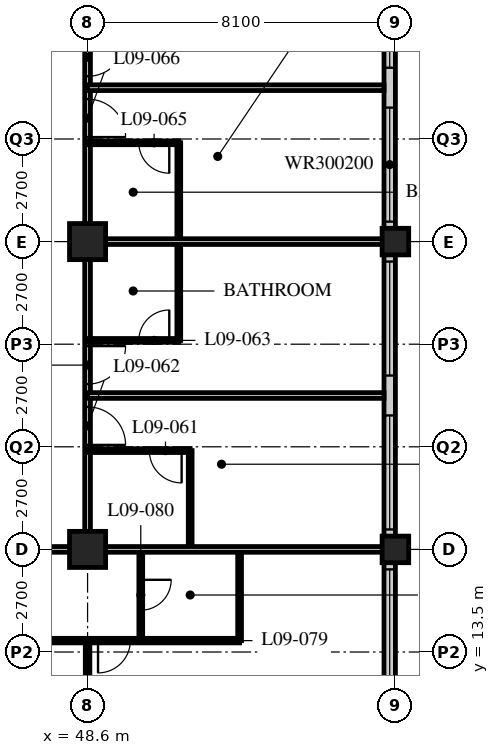
"""IFC4 building model, lengths in metres.
Left out: names, types, materials, properties, quantities, classifications, styles, units other than length and angle.
Written with IfcOpenShell. Run it as: python <this file> out.ifc"""

import sys

from ifc_helpers import new_model, si_unit, direction, frame, frame_2d, origin, origin_2d, place, context, subcontext, project, spatial, rectangle, hollow_rectangle, extrude, element, fill, save


model = new_model("IFC4")
c1 = context("Model", 3, precision=1e-05, world=origin(), true_north=direction((0.0, 1.0)))
c2 = subcontext(c1, "Body", "Model", "MODEL_VIEW")
j1 = project(units=[si_unit("LENGTHUNIT", "METRE"), si_unit("PLANEANGLEUNIT", "RADIAN")], contexts=[c1])
p1 = place(None, origin())
s1 = spatial("IfcSite", under=j1, at=p1, CompositionType="ELEMENT")
p2 = place(p1, origin())
s2 = spatial("IfcBuilding", under=s1, at=p2, CompositionType="ELEMENT")
p3 = place(p2, frame((0.0, 0.0, 43.2)))
s3 = spatial("IfcBuildingStorey", under=s2, at=p3, CompositionType="ELEMENT", Elevation=43.2)
for number, where, z_axis, x_axis in (
    (1, (48.6, 16.2, 0.0), (0.0, 0.0, 1.0), (1.0, 0.0, 0.0)),
    (2, (48.6, 24.3, 0.0), (0.0, 0.0, 1.0), (1.0, 0.0, 0.0)),
):
    element("IfcColumn", number, at=place(p3, frame(where, z_axis=z_axis, x_axis=x_axis)), inside=s3, PredefinedType="COLUMN", context=c2, shape_type="SweptSolid", body=[
        extrude(hollow_rectangle(XDim=0.95, YDim=0.95, WallThickness=0.095, at=origin_2d()), origin(), (0.0, 0.0, 1.0), 3.4),
    ])
for number, where, z_axis, x_axis in (
    (3, (56.7, 16.2, 0.0), (0.0, 0.0, 1.0), (1.0, 0.0, 0.0)),
    (4, (56.7, 24.3, 0.0), (0.0, 0.0, 1.0), (1.0, 0.0, 0.0)),
):
    element("IfcColumn", number, at=place(p3, frame(where, z_axis=z_axis, x_axis=x_axis)), inside=s3, PredefinedType="COLUMN", context=c2, shape_type="SweptSolid", body=[
        extrude(hollow_rectangle(XDim=0.7, YDim=0.7, WallThickness=0.06, at=origin_2d()), origin(), (0.0, 0.0, 1.0), 3.4),
    ])
p4 = place(p3, frame((56.55, 8.4, 0.0), z_axis=(0.0, 0.0, 1.0), x_axis=(0.0, 1.0, 0.0)))
e5 = element("IfcWall", 5, at=p4, inside=s3, PredefinedType="SOLIDWALL", context=c2, shape_type="SweptSolid", body=[
    extrude(rectangle(XDim=32.1, YDim=0.3, at=frame_2d((16.05, 0.0))), origin(), (0.0, 0.0, 1.0), 3.19),
])
p5 = place(p4, frame((0.225, 0.0, 0.9)))
e6 = element("IfcOpeningElement", 6, at=p5, cuts=e5, PredefinedType="OPENING", context=c2, shape_type="SweptSolid", body=[
    extrude(rectangle(XDim=3.0, YDim=2.0, at=frame_2d((1.5, 1.0))), frame((0.0, 0.16, 0.0), z_axis=(0.0, -1.0, 0.0), x_axis=(1.0, 0.0, 0.0)), (0.0, 0.0, 1.0), 0.32),
])
p6 = place(p4, frame((4.275, 0.0, 0.9)))
e7 = element("IfcOpeningElement", 7, at=p6, cuts=e5, PredefinedType="OPENING", context=c2, shape_type="SweptSolid", body=[
    extrude(rectangle(XDim=3.0, YDim=2.0, at=frame_2d((1.5, 1.0))), frame((0.0, 0.16, 0.0), z_axis=(0.0, -1.0, 0.0), x_axis=(1.0, 0.0, 0.0)), (0.0, 0.0, 1.0), 0.32),
])
p7 = place(p4, frame((8.325, 0.0, 0.9)))
e8 = element("IfcOpeningElement", 8, at=p7, cuts=e5, PredefinedType="OPENING", context=c2, shape_type="SweptSolid", body=[
    extrude(rectangle(XDim=3.0, YDim=2.0, at=frame_2d((1.5, 1.0))), frame((0.0, 0.16, 0.0), z_axis=(0.0, -1.0, 0.0), x_axis=(1.0, 0.0, 0.0)), (0.0, 0.0, 1.0), 0.32),
])
p8 = place(p4, frame((12.375, 0.0, 0.9)))
e9 = element("IfcOpeningElement", 9, at=p8, cuts=e5, PredefinedType="OPENING", context=c2, shape_type="SweptSolid", body=[
    extrude(rectangle(XDim=3.0, YDim=2.0, at=frame_2d((1.5, 1.0))), frame((0.0, 0.16, 0.0), z_axis=(0.0, -1.0, 0.0), x_axis=(1.0, 0.0, 0.0)), (0.0, 0.0, 1.0), 0.32),
])
p9 = place(p4, frame((16.425, 0.0, 0.9)))
e10 = element("IfcOpeningElement", 10, at=p9, cuts=e5, PredefinedType="OPENING", context=c2, shape_type="SweptSolid", body=[
    extrude(rectangle(XDim=3.0, YDim=2.0, at=frame_2d((1.5, 1.0))), frame((0.0, 0.16, 0.0), z_axis=(0.0, -1.0, 0.0), x_axis=(1.0, 0.0, 0.0)), (0.0, 0.0, 1.0), 0.32),
])
p10 = place(p4, frame((20.475, 0.0, 0.9)))
e11 = element("IfcOpeningElement", 11, at=p10, cuts=e5, PredefinedType="OPENING", context=c2, shape_type="SweptSolid", body=[
    extrude(rectangle(XDim=3.0, YDim=2.0, at=frame_2d((1.5, 1.0))), frame((0.0, 0.16, 0.0), z_axis=(0.0, -1.0, 0.0), x_axis=(1.0, 0.0, 0.0)), (0.0, 0.0, 1.0), 0.32),
])
p11 = place(p4, frame((24.525, 0.0, 0.9)))
e12 = element("IfcOpeningElement", 12, at=p11, cuts=e5, PredefinedType="OPENING", context=c2, shape_type="SweptSolid", body=[
    extrude(rectangle(XDim=3.0, YDim=2.0, at=frame_2d((1.5, 1.0))), frame((0.0, 0.16, 0.0), z_axis=(0.0, -1.0, 0.0), x_axis=(1.0, 0.0, 0.0)), (0.0, 0.0, 1.0), 0.32),
])
p12 = place(p4, frame((28.575, 0.0, 0.9)))
e13 = element("IfcOpeningElement", 13, at=p12, cuts=e5, PredefinedType="OPENING", context=c2, shape_type="SweptSolid", body=[
    extrude(rectangle(XDim=3.0, YDim=2.0, at=frame_2d((1.5, 1.0))), frame((0.0, 0.16, 0.0), z_axis=(0.0, -1.0, 0.0), x_axis=(1.0, 0.0, 0.0)), (0.0, 0.0, 1.0), 0.32),
])
p13 = place(p3, frame((8.1, 16.2, 0.0), z_axis=(0.0, 0.0, 1.0), x_axis=(1.0, 0.0, 0.0)))
e14 = element("IfcWall", 14, at=p13, inside=s3, PredefinedType="PARTITIONING", context=c2, shape_type="SweptSolid", body=[
    extrude(rectangle(XDim=40.5, YDim=0.15, at=frame_2d((20.25, 0.0))), origin(), (0.0, 0.0, 1.0), 2.578),
])
p14 = place(p13, frame((4.35, 0.0, 0.0)))
e15 = element("IfcOpeningElement", 15, at=p14, cuts=e14, PredefinedType="OPENING", context=c2, shape_type="SweptSolid", body=[
    extrude(rectangle(XDim=1.0, YDim=2.1, at=frame_2d((0.5, 1.05))), frame((0.0, 0.085, 0.0), z_axis=(0.0, -1.0, 0.0), x_axis=(1.0, 0.0, 0.0)), (0.0, 0.0, 1.0), 0.17),
])
p15 = place(p13, frame((10.85, 0.0, 0.0)))
e16 = element("IfcOpeningElement", 16, at=p15, cuts=e14, PredefinedType="OPENING", context=c2, shape_type="SweptSolid", body=[
    extrude(rectangle(XDim=1.0, YDim=2.1, at=frame_2d((0.5, 1.05))), frame((0.0, 0.085, 0.0), z_axis=(0.0, -1.0, 0.0), x_axis=(1.0, 0.0, 0.0)), (0.0, 0.0, 1.0), 0.17),
])
p16 = place(p13, frame((12.75, 0.0, 0.0)))
e17 = element("IfcOpeningElement", 17, at=p16, cuts=e14, PredefinedType="OPENING", context=c2, shape_type="SweptSolid", body=[
    extrude(rectangle(XDim=1.0, YDim=2.1, at=frame_2d((0.5, 1.05))), frame((0.0, 0.085, 0.0), z_axis=(0.0, -1.0, 0.0), x_axis=(1.0, 0.0, 0.0)), (0.0, 0.0, 1.0), 0.17),
])
p17 = place(p13, frame((18.95, 0.0, 0.0)))
e18 = element("IfcOpeningElement", 18, at=p17, cuts=e14, PredefinedType="OPENING", context=c2, shape_type="SweptSolid", body=[
    extrude(rectangle(XDim=1.0, YDim=2.1, at=frame_2d((0.5, 1.05))), frame((0.0, 0.085, 0.0), z_axis=(0.0, -1.0, 0.0), x_axis=(1.0, 0.0, 0.0)), (0.0, 0.0, 1.0), 0.17),
])
p18 = place(p13, frame((20.55, 0.0, 0.0)))
e19 = element("IfcOpeningElement", 19, at=p18, cuts=e14, PredefinedType="OPENING", context=c2, shape_type="SweptSolid", body=[
    extrude(rectangle(XDim=1.0, YDim=2.1, at=frame_2d((0.5, 1.05))), frame((0.0, 0.085, 0.0), z_axis=(0.0, -1.0, 0.0), x_axis=(1.0, 0.0, 0.0)), (0.0, 0.0, 1.0), 0.17),
])
p19 = place(p13, frame((27.05, 0.0, 0.0)))
e20 = element("IfcOpeningElement", 20, at=p19, cuts=e14, PredefinedType="OPENING", context=c2, shape_type="SweptSolid", body=[
    extrude(rectangle(XDim=1.0, YDim=2.1, at=frame_2d((0.5, 1.05))), frame((0.0, 0.085, 0.0), z_axis=(0.0, -1.0, 0.0), x_axis=(1.0, 0.0, 0.0)), (0.0, 0.0, 1.0), 0.17),
])
p20 = place(p13, frame((28.95, 0.0, 0.0)))
e21 = element("IfcOpeningElement", 21, at=p20, cuts=e14, PredefinedType="OPENING", context=c2, shape_type="SweptSolid", body=[
    extrude(rectangle(XDim=1.0, YDim=2.1, at=frame_2d((0.5, 1.05))), frame((0.0, 0.085, 0.0), z_axis=(0.0, -1.0, 0.0), x_axis=(1.0, 0.0, 0.0)), (0.0, 0.0, 1.0), 0.17),
])
p21 = place(p13, frame((34.85, 0.0, 0.0)))
e22 = element("IfcOpeningElement", 22, at=p21, cuts=e14, PredefinedType="OPENING", context=c2, shape_type="SweptSolid", body=[
    extrude(rectangle(XDim=1.0, YDim=2.1, at=frame_2d((0.5, 1.05))), frame((0.0, 0.085, 0.0), z_axis=(0.0, -1.0, 0.0), x_axis=(1.0, 0.0, 0.0)), (0.0, 0.0, 1.0), 0.17),
])
p22 = place(p13, frame((1.525, 0.0, 0.0)))
e23 = element("IfcOpeningElement", 23, at=p22, cuts=e14, PredefinedType="OPENING", context=c2, shape_type="SweptSolid", body=[
    extrude(rectangle(XDim=1.0, YDim=2.1, at=frame_2d((0.5, 1.05))), frame((0.0, 0.085, 0.0), z_axis=(0.0, -1.0, 0.0), x_axis=(1.0, 0.0, 0.0)), (0.0, 0.0, 1.0), 0.17),
])
p23 = place(p13, frame((37.975, 0.0, 0.0)))
e24 = element("IfcOpeningElement", 24, at=p23, cuts=e14, PredefinedType="OPENING", context=c2, shape_type="SweptSolid", body=[
    extrude(rectangle(XDim=1.0, YDim=2.1, at=frame_2d((0.5, 1.05))), frame((0.0, 0.085, 0.0), z_axis=(0.0, -1.0, 0.0), x_axis=(1.0, 0.0, 0.0)), (0.0, 0.0, 1.0), 0.17),
])
p24 = place(p3, frame((48.6, 16.2, 0.0), z_axis=(0.0, 0.0, 1.0), x_axis=(0.0, 1.0, 0.0)))
e25 = element("IfcWall", 25, at=p24, inside=s3, PredefinedType="PARTITIONING", context=c2, shape_type="SweptSolid", body=[
    extrude(rectangle(XDim=26.1, YDim=0.15, at=frame_2d((13.05, 0.0))), origin(), (0.0, 0.0, 1.0), 2.578),
])
p25 = place(p24, frame((2.75, 0.0, 0.0)))
e26 = element("IfcOpeningElement", 26, at=p25, cuts=e25, PredefinedType="OPENING", context=c2, shape_type="SweptSolid", body=[
    extrude(rectangle(XDim=1.0, YDim=2.1, at=frame_2d((0.5, 1.05))), frame((0.0, 0.085, 0.0), z_axis=(0.0, -1.0, 0.0), x_axis=(1.0, 0.0, 0.0)), (0.0, 0.0, 1.0), 0.17),
])
p26 = place(p24, frame((4.35, 0.0, 0.0)))
e27 = element("IfcOpeningElement", 27, at=p26, cuts=e25, PredefinedType="OPENING", context=c2, shape_type="SweptSolid", body=[
    extrude(rectangle(XDim=1.0, YDim=2.1, at=frame_2d((0.5, 1.05))), frame((0.0, 0.085, 0.0), z_axis=(0.0, -1.0, 0.0), x_axis=(1.0, 0.0, 0.0)), (0.0, 0.0, 1.0), 0.17),
])
p27 = place(p24, frame((10.85, 0.0, 0.0)))
e28 = element("IfcOpeningElement", 28, at=p27, cuts=e25, PredefinedType="OPENING", context=c2, shape_type="SweptSolid", body=[
    extrude(rectangle(XDim=1.0, YDim=2.1, at=frame_2d((0.5, 1.05))), frame((0.0, 0.085, 0.0), z_axis=(0.0, -1.0, 0.0), x_axis=(1.0, 0.0, 0.0)), (0.0, 0.0, 1.0), 0.17),
])
p28 = place(p24, frame((12.45, 0.0, 0.0)))
e29 = element("IfcOpeningElement", 29, at=p28, cuts=e25, PredefinedType="OPENING", context=c2, shape_type="SweptSolid", body=[
    extrude(rectangle(XDim=1.0, YDim=2.1, at=frame_2d((0.5, 1.05))), frame((0.0, 0.085, 0.0), z_axis=(0.0, -1.0, 0.0), x_axis=(1.0, 0.0, 0.0)), (0.0, 0.0, 1.0), 0.17),
])
p29 = place(p24, frame((18.65, 0.0, 0.0)))
e30 = element("IfcOpeningElement", 30, at=p29, cuts=e25, PredefinedType="OPENING", context=c2, shape_type="SweptSolid", body=[
    extrude(rectangle(XDim=1.0, YDim=2.1, at=frame_2d((0.5, 1.05))), frame((0.0, 0.085, 0.0), z_axis=(0.0, -1.0, 0.0), x_axis=(1.0, 0.0, 0.0)), (0.0, 0.0, 1.0), 0.17),
])
p30 = place(p24, frame((22.7, 0.0, 0.0)))
e31 = element("IfcOpeningElement", 31, at=p30, cuts=e25, PredefinedType="OPENING", context=c2, shape_type="SweptSolid", body=[
    extrude(rectangle(XDim=1.0, YDim=2.1, at=frame_2d((0.5, 1.05))), frame((0.0, 0.085, 0.0), z_axis=(0.0, -1.0, 0.0), x_axis=(1.0, 0.0, 0.0)), (0.0, 0.0, 1.0), 0.17),
])
p31 = place(p3, frame((51.3, 16.2, 0.0), z_axis=(0.0, 0.0, 1.0), x_axis=(0.0, 1.0, 0.0)))
e32 = element("IfcWall", 32, at=p31, inside=s3, PredefinedType="PARTITIONING", context=c2, shape_type="SweptSolid", body=[
    extrude(rectangle(XDim=2.6, YDim=0.1, at=frame_2d((1.3, 0.0))), origin(), (0.0, 0.0, 1.0), 3.19),
])
p32 = place(p3, frame((48.6, 18.8, 0.0), z_axis=(0.0, 0.0, 1.0), x_axis=(1.0, 0.0, 0.0)))
e33 = element("IfcWall", 33, at=p32, inside=s3, PredefinedType="PARTITIONING", context=c2, shape_type="SweptSolid", body=[
    extrude(rectangle(XDim=2.7, YDim=0.1, at=frame_2d((1.35, 0.0))), origin(), (0.0, 0.0, 1.0), 3.19),
])
p33 = place(p32, frame((1.625, 0.0, 0.0)))
e34 = element("IfcOpeningElement", 34, at=p33, cuts=e33, PredefinedType="OPENING", context=c2, shape_type="SweptSolid", body=[
    extrude(rectangle(XDim=0.85, YDim=2.1, at=frame_2d((0.425, 1.05))), frame((0.0, 0.06, 0.0), z_axis=(0.0, -1.0, 0.0), x_axis=(1.0, 0.0, 0.0)), (0.0, 0.0, 1.0), 0.12),
])
p34 = place(p3, frame((48.6, 20.25, 0.0), z_axis=(0.0, 0.0, 1.0), x_axis=(1.0, 0.0, 0.0)))
e35 = element("IfcWall", 35, at=p34, inside=s3, PredefinedType="PARTITIONING", context=c2, shape_type="SweptSolid", body=[
    extrude(rectangle(XDim=7.8, YDim=0.15, at=frame_2d((3.9, 0.0))), origin(), (0.0, 0.0, 1.0), 3.19),
])
p35 = place(p3, frame((51.0, 21.7, 0.0), z_axis=(0.0, 0.0, 1.0), x_axis=(0.0, 1.0, 0.0)))
e36 = element("IfcWall", 36, at=p35, inside=s3, PredefinedType="PARTITIONING", context=c2, shape_type="SweptSolid", body=[
    extrude(rectangle(XDim=5.2, YDim=0.1, at=frame_2d((2.6, 0.0))), origin(), (0.0, 0.0, 1.0), 3.19),
])
p36 = place(p3, frame((48.6, 21.7, 0.0), z_axis=(0.0, 0.0, 1.0), x_axis=(1.0, 0.0, 0.0)))
e37 = element("IfcWall", 37, at=p36, inside=s3, PredefinedType="PARTITIONING", context=c2, shape_type="SweptSolid", body=[
    extrude(rectangle(XDim=2.4, YDim=0.1, at=frame_2d((1.2, 0.0))), origin(), (0.0, 0.0, 1.0), 3.19),
])
p37 = place(p36, frame((1.35, 0.0, 0.0)))
e38 = element("IfcOpeningElement", 38, at=p37, cuts=e37, PredefinedType="OPENING", context=c2, shape_type="SweptSolid", body=[
    extrude(rectangle(XDim=0.8, YDim=2.1, at=frame_2d((0.4, 1.05))), frame((0.0, 0.06, 0.0), z_axis=(0.0, -1.0, 0.0), x_axis=(1.0, 0.0, 0.0)), (0.0, 0.0, 1.0), 0.12),
])
p38 = place(p3, frame((48.6, 24.3, 0.0), z_axis=(0.0, 0.0, 1.0), x_axis=(1.0, 0.0, 0.0)))
e39 = element("IfcWall", 39, at=p38, inside=s3, PredefinedType="PARTITIONING", context=c2, shape_type="SweptSolid", body=[
    extrude(rectangle(XDim=7.8, YDim=0.15, at=frame_2d((3.9, 0.0))), origin(), (0.0, 0.0, 1.0), 2.578),
])
p39 = place(p3, frame((48.6, 26.9, 0.0), z_axis=(0.0, 0.0, 1.0), x_axis=(1.0, 0.0, 0.0)))
e40 = element("IfcWall", 40, at=p39, inside=s3, PredefinedType="PARTITIONING", context=c2, shape_type="SweptSolid", body=[
    extrude(rectangle(XDim=2.4, YDim=0.1, at=frame_2d((1.2, 0.0))), origin(), (0.0, 0.0, 1.0), 3.19),
])
p40 = place(p39, frame((1.35, 0.0, 0.0)))
e41 = element("IfcOpeningElement", 41, at=p40, cuts=e40, PredefinedType="OPENING", context=c2, shape_type="SweptSolid", body=[
    extrude(rectangle(XDim=0.8, YDim=2.1, at=frame_2d((0.4, 1.05))), frame((0.0, 0.06, 0.0), z_axis=(0.0, -1.0, 0.0), x_axis=(1.0, 0.0, 0.0)), (0.0, 0.0, 1.0), 0.12),
])
p41 = place(p3, frame((48.6, 28.35, 0.0), z_axis=(0.0, 0.0, 1.0), x_axis=(1.0, 0.0, 0.0)))
e42 = element("IfcWall", 42, at=p41, inside=s3, PredefinedType="PARTITIONING", context=c2, shape_type="SweptSolid", body=[
    extrude(rectangle(XDim=7.8, YDim=0.15, at=frame_2d((3.9, 0.0))), origin(), (0.0, 0.0, 1.0), 3.19),
])
p42 = place(p3, frame((44.55, 13.8, 0.0), z_axis=(0.0, 0.0, 1.0), x_axis=(1.0, 0.0, 0.0)))
e43 = element("IfcWall", 43, at=p42, inside=s3, PredefinedType="PARTITIONING", context=c2, shape_type="SweptSolid", body=[
    extrude(rectangle(XDim=8.05, YDim=0.12, at=frame_2d((4.025, 0.0))), origin(), (0.0, 0.0, 1.0), 3.19),
])
p43 = place(p42, frame((0.475, 0.0, 0.0)))
e44 = element("IfcOpeningElement", 44, at=p43, cuts=e43, PredefinedType="OPENING", context=c2, shape_type="SweptSolid", body=[
    extrude(rectangle(XDim=0.85, YDim=2.1, at=frame_2d((0.425, 1.05))), frame((0.0, 0.07, 0.0), z_axis=(0.0, -1.0, 0.0), x_axis=(1.0, 0.0, 0.0)), (0.0, 0.0, 1.0), 0.14),
])
p44 = place(p42, frame((4.325, 0.0, 0.0)))
e45 = element("IfcOpeningElement", 45, at=p44, cuts=e43, PredefinedType="OPENING", context=c2, shape_type="SweptSolid", body=[
    extrude(rectangle(XDim=0.85, YDim=2.1, at=frame_2d((0.425, 1.05))), frame((0.0, 0.07, 0.0), z_axis=(0.0, -1.0, 0.0), x_axis=(1.0, 0.0, 0.0)), (0.0, 0.0, 1.0), 0.14),
])
p45 = place(p3, frame((50.0, 16.2, 0.0), z_axis=(0.0, 0.0, 1.0), x_axis=(0.0, -1.0, 0.0)))
e46 = element("IfcWall", 46, at=p45, inside=s3, PredefinedType="PARTITIONING", context=c2, shape_type="SweptSolid", body=[
    extrude(rectangle(XDim=2.4, YDim=0.1, at=frame_2d((1.2, 0.0))), origin(), (0.0, 0.0, 1.0), 3.19),
])
p46 = place(p45, frame((0.8, 0.0, 0.0)))
e47 = element("IfcOpeningElement", 47, at=p46, cuts=e46, PredefinedType="OPENING", context=c2, shape_type="SweptSolid", body=[
    extrude(rectangle(XDim=0.8, YDim=2.1, at=frame_2d((0.4, 1.05))), frame((0.0, 0.06, 0.0), z_axis=(0.0, -1.0, 0.0), x_axis=(1.0, 0.0, 0.0)), (0.0, 0.0, 1.0), 0.12),
])
p47 = place(p3, frame((52.6, 16.2, 0.0), z_axis=(0.0, 0.0, 1.0), x_axis=(0.0, -1.0, 0.0)))
e48 = element("IfcWall", 48, at=p47, inside=s3, PredefinedType="PARTITIONING", context=c2, shape_type="SweptSolid", body=[
    extrude(rectangle(XDim=2.4, YDim=0.1, at=frame_2d((1.2, 0.0))), origin(), (0.0, 0.0, 1.0), 3.19),
])
p48 = place(p3, frame((48.6, 13.8, 0.0), z_axis=(0.0, 0.0, 1.0), x_axis=(0.0, -1.0, 0.0)))
e49 = element("IfcWall", 49, at=p48, inside=s3, PredefinedType="PARTITIONING", context=c2, shape_type="SweptSolid", body=[
    extrude(rectangle(XDim=9.45, YDim=0.12, at=frame_2d((4.725, 0.0))), origin(), (0.0, 0.0, 1.0), 2.578),
])
p49 = place(p3, frame((48.6, 16.2, 0.0), z_axis=(0.0, 0.0, 1.0), x_axis=(1.0, 0.0, 0.0)))
e50 = element("IfcWall", 50, at=p49, inside=s3, PredefinedType="PARTITIONING", context=c2, shape_type="SweptSolid", body=[
    extrude(rectangle(XDim=7.8, YDim=0.15, at=frame_2d((3.9, 0.0))), origin(), (0.0, 0.0, 1.0), 2.578),
])
p50 = place(p6, origin())
e51 = element("IfcWindow", 51, at=p50, inside=s3, PartitioningType="SINGLE_PANEL", PredefinedType="WINDOW", context=c2, shape_type="SweptSolid", body=[
    extrude(rectangle(XDim=3.0, YDim=2.0, at=frame_2d((1.5, 1.0))), frame((0.0, 0.03, 0.0), z_axis=(0.0, -1.0, 0.0), x_axis=(1.0, 0.0, 0.0)), (0.0, 0.0, 1.0), 0.06),
])
fill(e7, e51)
p51 = place(p7, origin())
e52 = element("IfcWindow", 52, at=p51, inside=s3, PartitioningType="SINGLE_PANEL", PredefinedType="WINDOW", context=c2, shape_type="SweptSolid", body=[
    extrude(rectangle(XDim=3.0, YDim=2.0, at=frame_2d((1.5, 1.0))), frame((0.0, 0.03, 0.0), z_axis=(0.0, -1.0, 0.0), x_axis=(1.0, 0.0, 0.0)), (0.0, 0.0, 1.0), 0.06),
])
fill(e8, e52)
p52 = place(p8, origin())
e53 = element("IfcWindow", 53, at=p52, inside=s3, PartitioningType="SINGLE_PANEL", PredefinedType="WINDOW", context=c2, shape_type="SweptSolid", body=[
    extrude(rectangle(XDim=3.0, YDim=2.0, at=frame_2d((1.5, 1.0))), frame((0.0, 0.03, 0.0), z_axis=(0.0, -1.0, 0.0), x_axis=(1.0, 0.0, 0.0)), (0.0, 0.0, 1.0), 0.06),
])
fill(e9, e53)
p53 = place(p9, origin())
e54 = element("IfcWindow", 54, at=p53, inside=s3, PartitioningType="SINGLE_PANEL", PredefinedType="WINDOW", context=c2, shape_type="SweptSolid", body=[
    extrude(rectangle(XDim=3.0, YDim=2.0, at=frame_2d((1.5, 1.0))), frame((0.0, 0.03, 0.0), z_axis=(0.0, -1.0, 0.0), x_axis=(1.0, 0.0, 0.0)), (0.0, 0.0, 1.0), 0.06),
])
fill(e10, e54)
p54 = place(p10, origin())
e55 = element("IfcWindow", 55, at=p54, inside=s3, PartitioningType="SINGLE_PANEL", PredefinedType="WINDOW", context=c2, shape_type="SweptSolid", body=[
    extrude(rectangle(XDim=3.0, YDim=2.0, at=frame_2d((1.5, 1.0))), frame((0.0, 0.03, 0.0), z_axis=(0.0, -1.0, 0.0), x_axis=(1.0, 0.0, 0.0)), (0.0, 0.0, 1.0), 0.06),
])
fill(e11, e55)
p55 = place(p33, origin())
e56 = element("IfcDoor", 56, at=p55, inside=s3, OperationType="SINGLE_SWING_LEFT", PredefinedType="DOOR", context=c2, shape_type="SweptSolid", body=[
    extrude(rectangle(XDim=0.85, YDim=2.1, at=frame_2d((0.425, 1.05))), frame((0.0, 0.025, 0.0), z_axis=(0.0, -1.0, 0.0), x_axis=(1.0, 0.0, 0.0)), (0.0, 0.0, 1.0), 0.05),
])
fill(e34, e56)
p56 = place(p25, origin())
e57 = element("IfcDoor", 57, at=p56, inside=s3, OperationType="SINGLE_SWING_RIGHT", PredefinedType="DOOR", context=c2, shape_type="SweptSolid", body=[
    extrude(rectangle(XDim=1.0, YDim=2.1, at=frame_2d((0.5, 1.05))), frame((0.0, 0.025, 0.0), z_axis=(0.0, -1.0, 0.0), x_axis=(1.0, 0.0, 0.0)), (0.0, 0.0, 1.0), 0.05),
])
fill(e26, e57)
p57 = place(p37, origin())
e58 = element("IfcDoor", 58, at=p57, inside=s3, OperationType="SINGLE_SWING_RIGHT", PredefinedType="DOOR", context=c2, shape_type="SweptSolid", body=[
    extrude(rectangle(XDim=0.8, YDim=2.1, at=frame_2d((0.4, 1.05))), frame((0.0, 0.025, 0.0), z_axis=(0.0, -1.0, 0.0), x_axis=(1.0, 0.0, 0.0)), (0.0, 0.0, 1.0), 0.05),
])
fill(e38, e58)
p58 = place(p26, origin())
e59 = element("IfcDoor", 59, at=p58, inside=s3, OperationType="SINGLE_SWING_LEFT", PredefinedType="DOOR", context=c2, shape_type="SweptSolid", body=[
    extrude(rectangle(XDim=1.0, YDim=2.1, at=frame_2d((0.5, 1.05))), frame((0.0, 0.025, 0.0), z_axis=(0.0, -1.0, 0.0), x_axis=(1.0, 0.0, 0.0)), (0.0, 0.0, 1.0), 0.05),
])
fill(e27, e59)
p59 = place(p40, origin())
e60 = element("IfcDoor", 60, at=p59, inside=s3, OperationType="SINGLE_SWING_LEFT", PredefinedType="DOOR", context=c2, shape_type="SweptSolid", body=[
    extrude(rectangle(XDim=0.8, YDim=2.1, at=frame_2d((0.4, 1.05))), frame((0.0, 0.025, 0.0), z_axis=(0.0, -1.0, 0.0), x_axis=(1.0, 0.0, 0.0)), (0.0, 0.0, 1.0), 0.05),
])
fill(e41, e60)
p60 = place(p27, origin())
e61 = element("IfcDoor", 61, at=p60, inside=s3, OperationType="SINGLE_SWING_RIGHT", PredefinedType="DOOR", context=c2, shape_type="SweptSolid", body=[
    extrude(rectangle(XDim=1.0, YDim=2.1, at=frame_2d((0.5, 1.05))), frame((0.0, 0.025, 0.0), z_axis=(0.0, -1.0, 0.0), x_axis=(1.0, 0.0, 0.0)), (0.0, 0.0, 1.0), 0.05),
])
fill(e28, e61)
p61 = place(p28, origin())
e62 = element("IfcDoor", 62, at=p61, inside=s3, OperationType="SINGLE_SWING_LEFT", PredefinedType="DOOR", context=c2, shape_type="SweptSolid", body=[
    extrude(rectangle(XDim=1.0, YDim=2.1, at=frame_2d((0.5, 1.05))), frame((0.0, 0.025, 0.0), z_axis=(0.0, -1.0, 0.0), x_axis=(1.0, 0.0, 0.0)), (0.0, 0.0, 1.0), 0.05),
])
fill(e29, e62)
p62 = place(p46, origin())
e63 = element("IfcDoor", 63, at=p62, inside=s3, OperationType="SINGLE_SWING_LEFT", PredefinedType="DOOR", context=c2, shape_type="SweptSolid", body=[
    extrude(rectangle(XDim=0.8, YDim=2.1, at=frame_2d((0.4, 1.05))), frame((0.0, 0.025, 0.0), z_axis=(0.0, -1.0, 0.0), x_axis=(1.0, 0.0, 0.0)), (0.0, 0.0, 1.0), 0.05),
])
fill(e47, e63)
p63 = place(p44, origin())
e64 = element("IfcDoor", 64, at=p63, inside=s3, OperationType="SINGLE_SWING_RIGHT", PredefinedType="DOOR", context=c2, shape_type="SweptSolid", body=[
    extrude(rectangle(XDim=0.85, YDim=2.1, at=frame_2d((0.425, 1.05))), frame((0.0, 0.025, 0.0), z_axis=(0.0, -1.0, 0.0), x_axis=(1.0, 0.0, 0.0)), (0.0, 0.0, 1.0), 0.05),
])
fill(e45, e64)
save(model, sys.argv[1])
